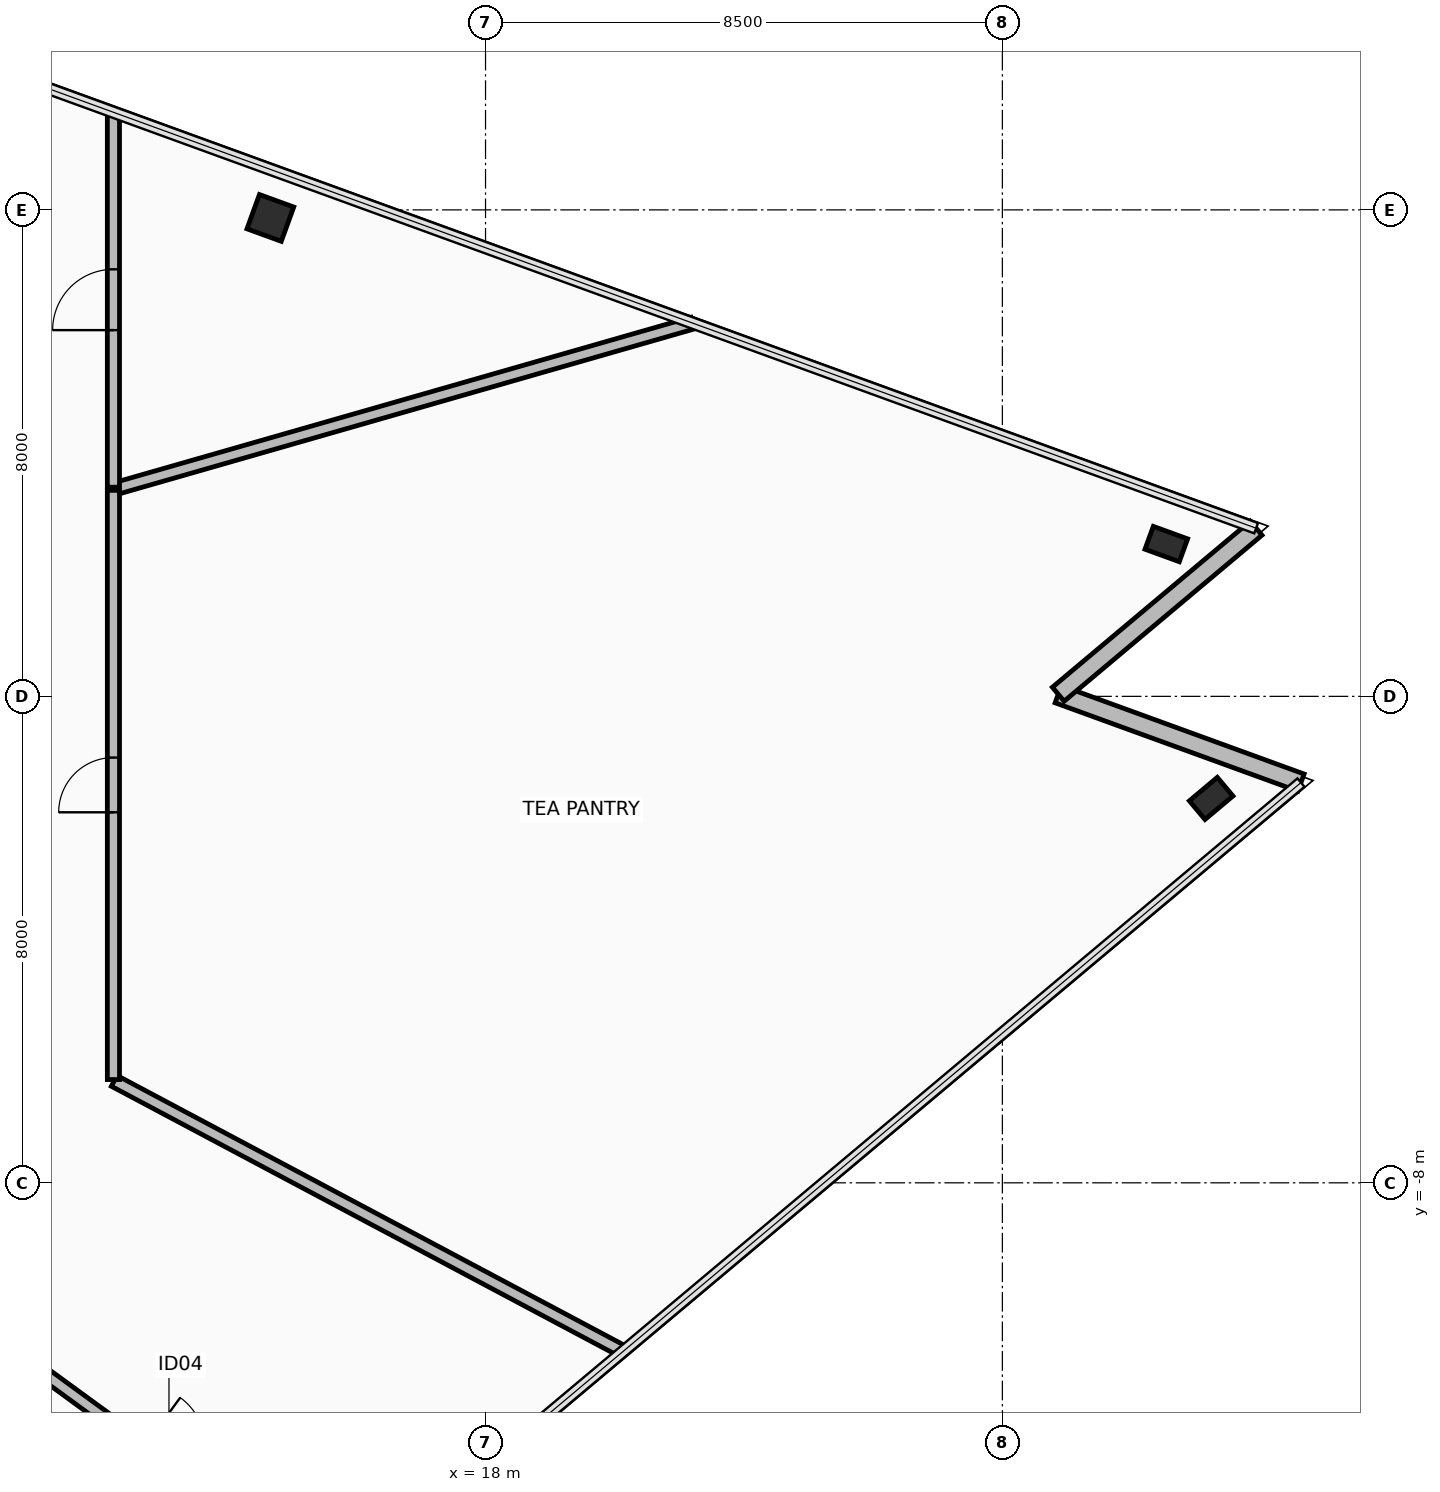
"""IFC4 building model, lengths in metres.
Left out: names, types, materials, properties, quantities, classifications, styles, units other than length and angle.
Written with IfcOpenShell. Run it as: python <this file> out.ifc"""

import sys

from ifc_helpers import new_model, si_unit, direction, frame, frame_2d, origin, origin_2d, place, context, subcontext, project, spatial, rectangle, hollow_rectangle, extrude, element, fill, save


model = new_model("IFC4")
c1 = context("Model", 3, precision=1e-05, world=origin(), true_north=direction((0.0, 1.0)))
c2 = subcontext(c1, "Body", "Model", "MODEL_VIEW")
j1 = project(units=[si_unit("LENGTHUNIT", "METRE"), si_unit("PLANEANGLEUNIT", "RADIAN")], contexts=[c1])
p1 = place(None, origin())
s1 = spatial("IfcSite", under=j1, at=p1, CompositionType="ELEMENT")
p2 = place(p1, origin())
s2 = spatial("IfcBuilding", under=s1, at=p2, CompositionType="ELEMENT")
p3 = place(p2, frame((0.0, 0.0, 174.1)))
s3 = spatial("IfcBuildingStorey", under=s2, at=p3, CompositionType="ELEMENT", Elevation=174.1)
for number, where, z_axis, x_axis in (
    (1, (29.934, -1.679, 0.0), (0.0, 0.0, 1.0), (0.766, 0.643, 0.0)),
    (2, (29.196, 2.505, 0.0), (0.0, 0.0, 1.0), (-0.94, 0.342, 0.0)),
):
    element("IfcColumn", number, at=place(p3, frame(where, z_axis=z_axis, x_axis=x_axis)), inside=s3, PredefinedType="COLUMN", context=c2, shape_type="SweptSolid", body=[
        extrude(hollow_rectangle(XDim=0.4, YDim=0.6, WallThickness=0.03, at=origin_2d()), origin(), (0.0, 0.0, 1.0), 3.6),
    ])
p4 = place(p3, frame((14.461, 7.868, 0.0), z_axis=(0.0, 0.0, 1.0), x_axis=(-0.939692023847, 0.342021783398, 0.0)))
e3 = element("IfcColumn", 3, at=p4, inside=s3, PredefinedType="COLUMN", context=c2, shape_type="SweptSolid", body=[
    extrude(hollow_rectangle(XDim=0.6, YDim=0.6, WallThickness=0.036, at=origin_2d()), origin(), (0.0, 0.0, 1.0), 3.6),
])
for number, where, z_axis, x_axis in (
    (4, (31.411, -1.418, 0.0), (0.0, 0.0, 1.0), (-0.94, 0.342, 0.0)),
    (5, (27.419, 0.035, 0.0), (0.0, 0.0, 1.0), (0.766, 0.643, 0.0)),
):
    element("IfcWall", number, at=place(p3, frame(where, z_axis=z_axis, x_axis=x_axis)), inside=s3, PredefinedType="STANDARD", context=c2, shape_type="SweptSolid", body=[
        extrude(rectangle(XDim=4.248, YDim=0.3, at=frame_2d((2.124, 0.0))), origin(), (0.0, 0.0, 1.0), 2.715),
    ])
p5 = place(p3, frame((21.406, 6.138, 0.0), z_axis=(0.0, 0.0, 1.0), x_axis=(-0.961265154156, -0.275625295294, 0.0)))
e6 = element("IfcWall", 6, at=p5, inside=s3, PredefinedType="PARTITIONING", context=c2, shape_type="SweptSolid", body=[
    extrude(rectangle(XDim=9.877, YDim=0.2, at=frame_2d((4.938, 0.0))), origin(), (0.0, 0.0, 1.0), 2.715),
])
p6 = place(p3, frame((11.88, 3.44, 0.0), z_axis=(0.0, 0.0, 1.0), x_axis=(0.0, 1.0, 0.0)))
e7 = element("IfcWall", 7, at=p6, inside=s3, PredefinedType="PARTITIONING", context=c2, shape_type="SweptSolid", body=[
    extrude(rectangle(XDim=6.166, YDim=0.2, at=frame_2d((3.083, 0.0))), origin(), (0.0, 0.0, 1.0), 2.715),
])
p7 = place(p6, frame((2.583, 0.0, 0.0)))
e8 = element("IfcOpeningElement", 8, at=p7, cuts=e7, PredefinedType="OPENING", context=c2, shape_type="SweptSolid", body=[
    extrude(rectangle(XDim=1.0, YDim=2.15, at=frame_2d((0.5, 1.075))), frame((0.0, 0.11, 0.0), z_axis=(0.0, -1.0, 0.0), x_axis=(1.0, 0.0, 0.0)), (0.0, 0.0, 1.0), 0.22),
])
p8 = place(p3, frame((9.985, -10.585, 0.0), z_axis=(0.0, 0.0, 1.0), x_axis=(0.807846973011, -0.589392287189, 0.0)))
e9 = element("IfcWall", 9, at=p8, inside=s3, PredefinedType="PARTITIONING", context=c2, shape_type="SweptSolid", body=[
    extrude(rectangle(XDim=6.954, YDim=0.2, at=frame_2d((3.477, 0.0))), origin(), (0.0, 0.0, 1.0), 2.715),
])
p9 = place(p8, frame((2.977, 0.0, 0.0)))
e10 = element("IfcOpeningElement", 10, at=p9, cuts=e9, PredefinedType="OPENING", context=c2, shape_type="SweptSolid", body=[
    extrude(rectangle(XDim=1.0, YDim=2.15, at=frame_2d((0.5, 1.075))), frame((0.0, 0.11, 0.0), z_axis=(0.0, -1.0, 0.0), x_axis=(1.0, 0.0, 0.0)), (0.0, 0.0, 1.0), 0.22),
])
p10 = place(p3, frame((20.247, -10.765, 0.0), z_axis=(0.0, 0.0, 1.0), x_axis=(-0.882947271035, 0.469472168048, 0.0)))
e11 = element("IfcWall", 11, at=p10, inside=s3, PredefinedType="PARTITIONING", context=c2, shape_type="SweptSolid", body=[
    extrude(rectangle(XDim=9.461, YDim=0.2, at=frame_2d((4.73, 0.0))), origin(), (0.0, 0.0, 1.0), 2.715),
])
p11 = place(p3, frame((11.88, -6.302, 0.0), z_axis=(0.0, 0.0, 1.0), x_axis=(0.0, 1.0, 0.0)))
e12 = element("IfcWall", 12, at=p11, inside=s3, PredefinedType="PARTITIONING", context=c2, shape_type="SweptSolid", body=[
    extrude(rectangle(XDim=9.689, YDim=0.2, at=frame_2d((4.845, 0.0))), origin(), (0.0, 0.0, 1.0), 3.42),
])
p12 = place(p11, frame((4.395, 0.0, 0.0)))
e13 = element("IfcOpeningElement", 13, at=p12, cuts=e12, PredefinedType="OPENING", context=c2, shape_type="SweptSolid", body=[
    extrude(rectangle(XDim=0.9, YDim=2.1, at=frame_2d((0.45, 1.05))), frame((0.0, 0.11, 0.0), z_axis=(0.0, -1.0, 0.0), x_axis=(1.0, 0.0, 0.0)), (0.0, 0.0, 1.0), 0.22),
])
p13 = place(p7, origin())
e14 = element("IfcDoor", 14, at=p13, inside=s3, OperationType="SINGLE_SWING_RIGHT", PredefinedType="DOOR", context=c2, shape_type="SweptSolid", body=[
    extrude(rectangle(XDim=1.0, YDim=2.15, at=frame_2d((0.5, 1.075))), frame((0.0, 0.025, 0.0), z_axis=(0.0, -1.0, 0.0), x_axis=(1.0, 0.0, 0.0)), (0.0, 0.0, 1.0), 0.05),
])
fill(e8, e14)
p14 = place(p12, origin())
e15 = element("IfcDoor", 15, at=p14, inside=s3, OperationType="SINGLE_SWING_LEFT", PredefinedType="DOOR", context=c2, shape_type="SweptSolid", body=[
    extrude(rectangle(XDim=0.9, YDim=2.1, at=frame_2d((0.45, 1.05))), frame((0.0, 0.025, 0.0), z_axis=(0.0, -1.0, 0.0), x_axis=(1.0, 0.0, 0.0)), (0.0, 0.0, 1.0), 0.05),
])
fill(e13, e15)
save(model, sys.argv[1])
